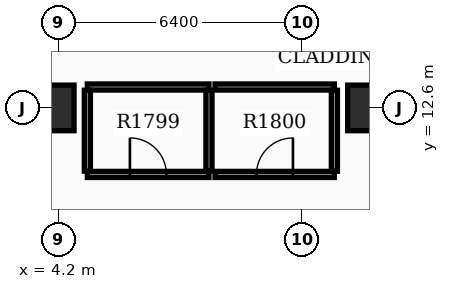
"""IFC4 building model, lengths in metres.
Left out: names, types, materials, properties, quantities, classifications, styles, units other than length and angle.
Written with IfcOpenShell. Run it as: python <this file> out.ifc"""

import sys

from ifc_helpers import new_model, si_unit, direction, frame, frame_2d, origin, origin_2d, place, context, subcontext, project, spatial, rectangle, extrude, element, fill, save


model = new_model("IFC4")
c1 = context("Model", 3, precision=1e-05, world=origin(), true_north=direction((0.0, 1.0)))
c2 = subcontext(c1, "Body", "Model", "MODEL_VIEW")
j1 = project(units=[si_unit("LENGTHUNIT", "METRE"), si_unit("PLANEANGLEUNIT", "RADIAN")], contexts=[c1])
p1 = place(None, origin())
s1 = spatial("IfcSite", under=j1, at=p1, CompositionType="ELEMENT")
p2 = place(p1, origin())
s2 = spatial("IfcBuilding", under=s1, at=p2, CompositionType="ELEMENT")
p3 = place(p2, frame((0.0, 0.0, 116.4)))
s3 = spatial("IfcBuildingStorey", under=s2, at=p3, CompositionType="ELEMENT", Elevation=116.4)
for number, where, z_axis, x_axis in (
    (1, (12.4, 12.6, 0.0), (0.0, 0.0, 1.0), (1.0, 0.0, 0.0)),
    (2, (4.0, 12.6, 0.0), (0.0, 0.0, 1.0), (1.0, 0.0, 0.0)),
):
    element("IfcColumn", number, at=place(p3, frame(where, z_axis=z_axis, x_axis=x_axis)), inside=s3, PredefinedType="COLUMN", context=c2, shape_type="SweptSolid", body=[
        extrude(rectangle(XDim=1.2, YDim=1.2, at=origin_2d()), origin(), (0.0, 0.0, 1.0), 3.9),
    ])
p4 = place(p3, frame((4.95, 10.85, 0.0), z_axis=(0.0, 0.0, 1.0), x_axis=(1.0, 0.0, 0.0)))
e3 = element("IfcWall", 3, at=p4, inside=s3, PredefinedType="PARTITIONING", context=c2, shape_type="SweptSolid", body=[
    extrude(rectangle(XDim=3.2, YDim=0.16, at=frame_2d((1.6, 0.0))), origin(), (0.0, 0.0, 1.0), 2.96),
])
p5 = place(p4, frame((1.12, 0.0, 0.0)))
e4 = element("IfcOpeningElement", 4, at=p5, cuts=e3, PredefinedType="OPENING", context=c2, shape_type="SweptSolid", body=[
    extrude(rectangle(XDim=0.96, YDim=2.15, at=frame_2d((0.48, 1.075))), frame((0.0, 0.09, 0.0), z_axis=(0.0, -1.0, 0.0), x_axis=(1.0, 0.0, 0.0)), (0.0, 0.0, 1.0), 0.18),
])
p6 = place(p3, frame((4.95, 13.15, 0.0), z_axis=(0.0, 0.0, 1.0), x_axis=(1.0, 0.0, 0.0)))
e5 = element("IfcWall", 5, at=p6, inside=s3, PredefinedType="PARTITIONING", context=c2, shape_type="SweptSolid", body=[
    extrude(rectangle(XDim=3.2, YDim=0.16, at=frame_2d((1.6, 0.0))), origin(), (0.0, 0.0, 1.0), 2.96),
])
for number, where, z_axis, x_axis in (
    (6, (4.95, 10.935, 0.0), (0.0, 0.0, 1.0), (0.0, 1.0, 0.0)),
    (7, (8.15, 10.935, 0.0), (0.0, 0.0, 1.0), (0.0, 1.0, 0.0)),
):
    element("IfcWall", number, at=place(p3, frame(where, z_axis=z_axis, x_axis=x_axis)), inside=s3, PredefinedType="PARTITIONING", context=c2, shape_type="SweptSolid", body=[
        extrude(rectangle(XDim=2.13, YDim=0.16, at=frame_2d((1.065, 0.0))), origin(), (0.0, 0.0, 1.0), 2.96),
    ])
p7 = place(p3, frame((8.31, 10.85, 0.0), z_axis=(0.0, 0.0, 1.0), x_axis=(1.0, 0.0, 0.0)))
e8 = element("IfcWall", 8, at=p7, inside=s3, PredefinedType="PARTITIONING", context=c2, shape_type="SweptSolid", body=[
    extrude(rectangle(XDim=3.14, YDim=0.16, at=frame_2d((1.57, 0.0))), origin(), (0.0, 0.0, 1.0), 2.96),
])
p8 = place(p7, frame((1.09, 0.0, 0.0)))
e9 = element("IfcOpeningElement", 9, at=p8, cuts=e8, PredefinedType="OPENING", context=c2, shape_type="SweptSolid", body=[
    extrude(rectangle(XDim=0.96, YDim=2.15, at=frame_2d((0.48, 1.075))), frame((0.0, 0.09, 0.0), z_axis=(0.0, -1.0, 0.0), x_axis=(1.0, 0.0, 0.0)), (0.0, 0.0, 1.0), 0.18),
])
p9 = place(p3, frame((8.31, 13.15, 0.0), z_axis=(0.0, 0.0, 1.0), x_axis=(1.0, 0.0, 0.0)))
e10 = element("IfcWall", 10, at=p9, inside=s3, PredefinedType="PARTITIONING", context=c2, shape_type="SweptSolid", body=[
    extrude(rectangle(XDim=3.14, YDim=0.16, at=frame_2d((1.57, 0.0))), origin(), (0.0, 0.0, 1.0), 2.96),
])
p10 = place(p3, frame((11.45, 10.935, 0.0), z_axis=(0.0, 0.0, 1.0), x_axis=(0.0, 1.0, 0.0)))
e11 = element("IfcWall", 11, at=p10, inside=s3, PredefinedType="PARTITIONING", context=c2, shape_type="SweptSolid", body=[
    extrude(rectangle(XDim=2.13, YDim=0.16, at=frame_2d((1.065, 0.0))), origin(), (0.0, 0.0, 1.0), 2.96),
])
p11 = place(p5, origin())
e12 = element("IfcDoor", 12, at=p11, inside=s3, OperationType="SINGLE_SWING_LEFT", PredefinedType="DOOR", context=c2, shape_type="SweptSolid", body=[
    extrude(rectangle(XDim=0.96, YDim=2.15, at=frame_2d((0.48, 1.075))), frame((0.0, 0.025, 0.0), z_axis=(0.0, -1.0, 0.0), x_axis=(1.0, 0.0, 0.0)), (0.0, 0.0, 1.0), 0.05),
])
fill(e4, e12)
p12 = place(p8, origin())
e13 = element("IfcDoor", 13, at=p12, inside=s3, OperationType="SINGLE_SWING_RIGHT", PredefinedType="DOOR", context=c2, shape_type="SweptSolid", body=[
    extrude(rectangle(XDim=0.96, YDim=2.15, at=frame_2d((0.48, 1.075))), frame((0.0, 0.025, 0.0), z_axis=(0.0, -1.0, 0.0), x_axis=(1.0, 0.0, 0.0)), (0.0, 0.0, 1.0), 0.05),
])
fill(e9, e13)
save(model, sys.argv[1])
